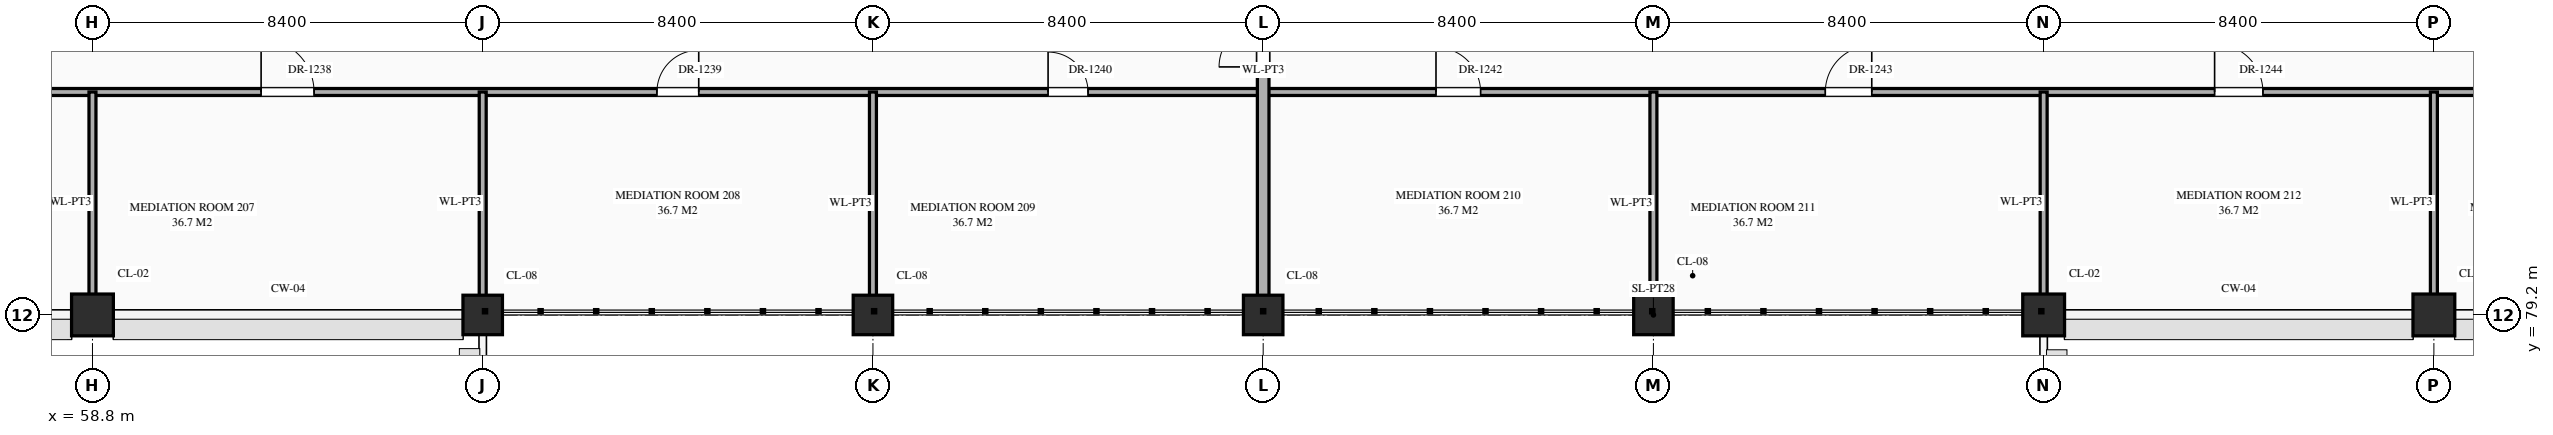
"""IFC4 building model, lengths in metres.
Left out: names, types, materials, properties, quantities, classifications, styles, units other than length and angle.
Written with IfcOpenShell. Run it as: python <this file> out.ifc"""

import sys

from ifc_helpers import new_model, si_unit, direction, frame, frame_2d, origin, origin_2d, place, context, subcontext, project, spatial, rectangle, circle, extrude, element, fill, save


model = new_model("IFC4")
c1 = context("Model", 3, precision=1e-05, world=origin(), true_north=direction((0.0, 1.0)))
c2 = subcontext(c1, "Body", "Model", "MODEL_VIEW")
j1 = project(units=[si_unit("LENGTHUNIT", "METRE"), si_unit("PLANEANGLEUNIT", "RADIAN")], contexts=[c1])
p1 = place(None, origin())
s1 = spatial("IfcSite", under=j1, at=p1, CompositionType="ELEMENT")
p2 = place(p1, origin())
s2 = spatial("IfcBuilding", under=s1, at=p2, CompositionType="ELEMENT")
p3 = place(p2, frame((0.0, 0.0, 5.4)))
s3 = spatial("IfcBuildingStorey", under=s2, at=p3, CompositionType="ELEMENT", Elevation=5.4)
p4 = place(p3, frame((58.8, 79.2, 0.0), z_axis=(0.0, 0.0, 1.0), x_axis=(1.0, 0.0, 0.0)))
e1 = element("IfcColumn", 1, at=p4, inside=s3, PredefinedType="COLUMN", context=c2, shape_type="SweptSolid", body=[
    extrude(rectangle(XDim=0.9, YDim=0.9, at=origin_2d()), origin(), (0.0, 0.0, 1.0), 5.4),
])
for number, where, z_axis, x_axis in (
    (2, (67.2, 79.2, 0.0), (0.0, 0.0, 1.0), (1.0, 0.0, 0.0)),
    (3, (75.6, 79.2, 0.0), (0.0, 0.0, 1.0), (1.0, 0.0, 0.0)),
    (4, (84.0, 79.2, 0.0), (0.0, 0.0, 1.0), (1.0, 0.0, 0.0)),
    (5, (92.4, 79.2, 0.0), (0.0, 0.0, 1.0), (1.0, 0.0, 0.0)),
):
    element("IfcColumn", number, at=place(p3, frame(where, z_axis=z_axis, x_axis=x_axis)), inside=s3, PredefinedType="COLUMN", context=c2, shape_type="SweptSolid", body=[
        extrude(circle(Radius=0.425, at=origin_2d()), origin(), (0.0, 0.0, 1.0), 5.4),
    ])
for number, where, z_axis, x_axis in (
    (6, (100.8, 79.2, 0.0), (0.0, 0.0, 1.0), (1.0, 0.0, 0.0)),
    (7, (109.2, 79.2, 0.0), (0.0, 0.0, 1.0), (1.0, 0.0, 0.0)),
):
    element("IfcColumn", number, at=place(p3, frame(where, z_axis=z_axis, x_axis=x_axis)), inside=s3, PredefinedType="COLUMN", context=c2, shape_type="SweptSolid", body=[
        extrude(rectangle(XDim=0.9, YDim=0.9, at=origin_2d()), origin(), (0.0, 0.0, 1.0), 5.4),
    ])
p5 = place(p3, frame((16.8, 84.0, 0.0), z_axis=(0.0, 0.0, 1.0), x_axis=(1.0, 0.0, 0.0)))
e8 = element("IfcWall", 8, at=p5, inside=s3, PredefinedType="STANDARD", context=c2, shape_type="SweptSolid", body=[
    extrude(rectangle(XDim=134.4, YDim=0.15, at=frame_2d((67.2, 0.0))), origin(), (0.0, 0.0, 1.0), 5.12),
])
p6 = place(p5, frame((3.58, 0.0, 0.0)))
e9 = element("IfcOpeningElement", 9, at=p6, cuts=e8, PredefinedType="OPENING", context=c2, shape_type="SweptSolid", body=[
    extrude(rectangle(XDim=1.24, YDim=2.3, at=frame_2d((0.62, 1.15))), frame((0.0, 0.087, 0.0), z_axis=(0.0, -1.0, 0.0), x_axis=(1.0, 0.0, 0.0)), (0.0, 0.0, 1.0), 0.174),
])
p7 = place(p5, frame((11.96, 0.0, 0.0)))
e10 = element("IfcOpeningElement", 10, at=p7, cuts=e8, PredefinedType="OPENING", context=c2, shape_type="SweptSolid", body=[
    extrude(rectangle(XDim=1.28, YDim=2.35, at=frame_2d((0.64, 1.175))), frame((0.0, 0.087, 0.0), z_axis=(0.0, -1.0, 0.0), x_axis=(1.0, 0.0, 0.0)), (0.0, 0.0, 1.0), 0.174),
])
p8 = place(p5, frame((20.53, 0.0, 0.0)))
e11 = element("IfcOpeningElement", 11, at=p8, cuts=e8, PredefinedType="OPENING", context=c2, shape_type="SweptSolid", body=[
    extrude(rectangle(XDim=0.94, YDim=2.3, at=frame_2d((0.47, 1.15))), frame((0.0, 0.087, 0.0), z_axis=(0.0, -1.0, 0.0), x_axis=(1.0, 0.0, 0.0)), (0.0, 0.0, 1.0), 0.174),
])
p9 = place(p5, frame((28.91, 0.0, 0.0)))
e12 = element("IfcOpeningElement", 12, at=p9, cuts=e8, PredefinedType="OPENING", context=c2, shape_type="SweptSolid", body=[
    extrude(rectangle(XDim=0.98, YDim=2.35, at=frame_2d((0.49, 1.175))), frame((0.0, 0.087, 0.0), z_axis=(0.0, -1.0, 0.0), x_axis=(1.0, 0.0, 0.0)), (0.0, 0.0, 1.0), 0.174),
])
p10 = place(p5, frame((37.27, 0.0, 0.0)))
e13 = element("IfcOpeningElement", 13, at=p10, cuts=e8, PredefinedType="OPENING", context=c2, shape_type="SweptSolid", body=[
    extrude(rectangle(XDim=1.06, YDim=2.4, at=frame_2d((0.53, 1.2))), frame((0.0, 0.087, 0.0), z_axis=(0.0, -1.0, 0.0), x_axis=(1.0, 0.0, 0.0)), (0.0, 0.0, 1.0), 0.174),
])
p11 = place(p5, frame((45.63, 0.0, 0.0)))
e14 = element("IfcOpeningElement", 14, at=p11, cuts=e8, PredefinedType="OPENING", context=c2, shape_type="SweptSolid", body=[
    extrude(rectangle(XDim=1.14, YDim=2.4, at=frame_2d((0.57, 1.2))), frame((0.0, 0.087, 0.0), z_axis=(0.0, -1.0, 0.0), x_axis=(1.0, 0.0, 0.0)), (0.0, 0.0, 1.0), 0.174),
])
p12 = place(p5, frame((54.15, 0.0, 0.0)))
e15 = element("IfcOpeningElement", 15, at=p12, cuts=e8, PredefinedType="OPENING", context=c2, shape_type="SweptSolid", body=[
    extrude(rectangle(XDim=0.9, YDim=2.15, at=frame_2d((0.45, 1.075))), frame((0.0, 0.087, 0.0), z_axis=(0.0, -1.0, 0.0), x_axis=(1.0, 0.0, 0.0)), (0.0, 0.0, 1.0), 0.174),
])
p13 = place(p5, frame((62.57, 0.0, 0.0)))
e16 = element("IfcOpeningElement", 16, at=p13, cuts=e8, PredefinedType="OPENING", context=c2, shape_type="SweptSolid", body=[
    extrude(rectangle(XDim=0.86, YDim=2.1, at=frame_2d((0.43, 1.05))), frame((0.0, 0.087, 0.0), z_axis=(0.0, -1.0, 0.0), x_axis=(1.0, 0.0, 0.0)), (0.0, 0.0, 1.0), 0.174),
])
p14 = place(p5, frame((70.92, 0.0, 0.0)))
e17 = element("IfcOpeningElement", 17, at=p14, cuts=e8, PredefinedType="OPENING", context=c2, shape_type="SweptSolid", body=[
    extrude(rectangle(XDim=0.96, YDim=2.2, at=frame_2d((0.48, 1.1))), frame((0.0, 0.087, 0.0), z_axis=(0.0, -1.0, 0.0), x_axis=(1.0, 0.0, 0.0)), (0.0, 0.0, 1.0), 0.174),
])
p15 = place(p5, frame((79.3, 0.0, 0.0)))
e18 = element("IfcOpeningElement", 18, at=p15, cuts=e8, PredefinedType="OPENING", context=c2, shape_type="SweptSolid", body=[
    extrude(rectangle(XDim=1.0, YDim=2.25, at=frame_2d((0.5, 1.125))), frame((0.0, 0.087, 0.0), z_axis=(0.0, -1.0, 0.0), x_axis=(1.0, 0.0, 0.0)), (0.0, 0.0, 1.0), 0.174),
])
p16 = place(p5, frame((87.68, 0.0, 0.0)))
e19 = element("IfcOpeningElement", 19, at=p16, cuts=e8, PredefinedType="OPENING", context=c2, shape_type="SweptSolid", body=[
    extrude(rectangle(XDim=1.04, YDim=2.2, at=frame_2d((0.52, 1.1))), frame((0.0, 0.087, 0.0), z_axis=(0.0, -1.0, 0.0), x_axis=(1.0, 0.0, 0.0)), (0.0, 0.0, 1.0), 0.174),
])
p17 = place(p5, frame((96.06, 0.0, 0.0)))
e20 = element("IfcOpeningElement", 20, at=p17, cuts=e8, PredefinedType="OPENING", context=c2, shape_type="SweptSolid", body=[
    extrude(rectangle(XDim=1.08, YDim=2.25, at=frame_2d((0.54, 1.125))), frame((0.0, 0.087, 0.0), z_axis=(0.0, -1.0, 0.0), x_axis=(1.0, 0.0, 0.0)), (0.0, 0.0, 1.0), 0.174),
])
p18 = place(p5, frame((104.44, 0.0, 0.0)))
e21 = element("IfcOpeningElement", 21, at=p18, cuts=e8, PredefinedType="OPENING", context=c2, shape_type="SweptSolid", body=[
    extrude(rectangle(XDim=1.12, YDim=2.25, at=frame_2d((0.56, 1.125))), frame((0.0, 0.087, 0.0), z_axis=(0.0, -1.0, 0.0), x_axis=(1.0, 0.0, 0.0)), (0.0, 0.0, 1.0), 0.174),
])
p19 = place(p5, frame((112.82, 0.0, 0.0)))
e22 = element("IfcOpeningElement", 22, at=p19, cuts=e8, PredefinedType="OPENING", context=c2, shape_type="SweptSolid", body=[
    extrude(rectangle(XDim=1.16, YDim=2.3, at=frame_2d((0.58, 1.15))), frame((0.0, 0.087, 0.0), z_axis=(0.0, -1.0, 0.0), x_axis=(1.0, 0.0, 0.0)), (0.0, 0.0, 1.0), 0.174),
])
p20 = place(p5, frame((121.2, 0.0, 0.0)))
e23 = element("IfcOpeningElement", 23, at=p20, cuts=e8, PredefinedType="OPENING", context=c2, shape_type="SweptSolid", body=[
    extrude(rectangle(XDim=1.2, YDim=2.35, at=frame_2d((0.6, 1.175))), frame((0.0, 0.087, 0.0), z_axis=(0.0, -1.0, 0.0), x_axis=(1.0, 0.0, 0.0)), (0.0, 0.0, 1.0), 0.174),
])
p21 = place(p5, frame((129.58, 0.0, 0.0)))
e24 = element("IfcOpeningElement", 24, at=p21, cuts=e8, PredefinedType="OPENING", context=c2, shape_type="SweptSolid", body=[
    extrude(rectangle(XDim=1.24, YDim=2.3, at=frame_2d((0.62, 1.15))), frame((0.0, 0.087, 0.0), z_axis=(0.0, -1.0, 0.0), x_axis=(1.0, 0.0, 0.0)), (0.0, 0.0, 1.0), 0.174),
])
for number, where, z_axis, x_axis in (
    (25, (58.8, 79.24, 0.0), (0.0, 0.0, 1.0), (0.0, 1.0, 0.0)),
    (26, (67.2, 79.24, 0.0), (0.0, 0.0, 1.0), (0.0, 1.0, 0.0)),
):
    element("IfcWall", number, at=place(p3, frame(where, z_axis=z_axis, x_axis=x_axis)), inside=s3, PredefinedType="STANDARD", context=c2, shape_type="SweptSolid", body=[
        extrude(rectangle(XDim=4.76, YDim=0.15, at=frame_2d((2.38, 0.0))), origin(), (0.0, 0.0, 1.0), 4.37),
    ])
p22 = place(p3, frame((75.6, 79.2, 0.0), z_axis=(0.0, 0.0, 1.0), x_axis=(0.0, 1.0, 0.0)))
e27 = element("IfcWall", 27, at=p22, inside=s3, PredefinedType="STANDARD", context=c2, shape_type="SweptSolid", body=[
    extrude(rectangle(XDim=4.8, YDim=0.15, at=frame_2d((2.4, 0.0))), origin(), (0.0, 0.0, 1.0), 4.37),
])
p23 = place(p3, frame((84.0, 79.2, 0.0), z_axis=(0.0, 0.0, 1.0), x_axis=(0.0, 1.0, 0.0)))
e28 = element("IfcWall", 28, at=p23, inside=s3, PredefinedType="STANDARD", context=c2, shape_type="SweptSolid", body=[
    extrude(rectangle(XDim=16.8, YDim=0.25, at=frame_2d((8.4, 0.0))), origin(), (0.0, 0.0, 1.0), 4.37),
])
p24 = place(p23, frame((12.465, 0.0, 0.0)))
e29 = element("IfcOpeningElement", 29, at=p24, cuts=e28, PredefinedType="OPENING", context=c2, shape_type="SweptSolid", body=[
    extrude(rectangle(XDim=1.1, YDim=2.2, at=frame_2d((0.55, 1.1))), frame((0.0, 0.137, 0.0), z_axis=(0.0, -1.0, 0.0), x_axis=(1.0, 0.0, 0.0)), (0.0, 0.0, 1.0), 0.274),
])
p25 = place(p23, frame((15.31, 0.0, 0.0)))
e30 = element("IfcOpeningElement", 30, at=p25, cuts=e28, PredefinedType="OPENING", context=c2, shape_type="SweptSolid", body=[
    extrude(rectangle(XDim=0.95, YDim=2.15, at=frame_2d((0.475, 1.075))), frame((0.0, 0.137, 0.0), z_axis=(0.0, -1.0, 0.0), x_axis=(1.0, 0.0, 0.0)), (0.0, 0.0, 1.0), 0.274),
])
p26 = place(p23, frame((5.34, 0.0, 0.0)))
e31 = element("IfcOpeningElement", 31, at=p26, cuts=e28, PredefinedType="OPENING", context=c2, shape_type="SweptSolid", body=[
    extrude(rectangle(XDim=0.95, YDim=2.15, at=frame_2d((0.475, 1.075))), frame((0.0, 0.137, 0.0), z_axis=(0.0, -1.0, 0.0), x_axis=(1.0, 0.0, 0.0)), (0.0, 0.0, 1.0), 0.274),
])
p27 = place(p3, frame((92.4, 79.2, 0.0), z_axis=(0.0, 0.0, 1.0), x_axis=(0.0, 1.0, 0.0)))
e32 = element("IfcWall", 32, at=p27, inside=s3, PredefinedType="STANDARD", context=c2, shape_type="SweptSolid", body=[
    extrude(rectangle(XDim=4.8, YDim=0.15, at=frame_2d((2.4, 0.0))), origin(), (0.0, 0.0, 1.0), 4.37),
])
for number, where, z_axis, x_axis in (
    (33, (100.8, 79.24, 0.0), (0.0, 0.0, 1.0), (0.0, 1.0, 0.0)),
    (34, (109.2, 79.24, 0.0), (0.0, 0.0, 1.0), (0.0, 1.0, 0.0)),
):
    element("IfcWall", number, at=place(p3, frame(where, z_axis=z_axis, x_axis=x_axis)), inside=s3, PredefinedType="STANDARD", context=c2, shape_type="SweptSolid", body=[
        extrude(rectangle(XDim=4.76, YDim=0.15, at=frame_2d((2.38, 0.0))), origin(), (0.0, 0.0, 1.0), 4.37),
    ])
p28 = place(p26, origin())
e35 = element("IfcDoor", 35, at=p28, inside=s3, OperationType="SINGLE_SWING_LEFT", PredefinedType="DOOR", context=c2, shape_type="SweptSolid", body=[
    extrude(rectangle(XDim=0.95, YDim=2.15, at=frame_2d((0.475, 1.075))), frame((0.0, 0.025, 0.0), z_axis=(0.0, -1.0, 0.0), x_axis=(1.0, 0.0, 0.0)), (0.0, 0.0, 1.0), 0.05),
])
fill(e31, e35)
p29 = place(p11, origin())
e36 = element("IfcDoor", 36, at=p29, inside=s3, OperationType="SINGLE_SWING_LEFT", PredefinedType="DOOR", context=c2, shape_type="SweptSolid", body=[
    extrude(rectangle(XDim=1.14, YDim=2.4, at=frame_2d((0.57, 1.2))), frame((0.0, 0.025, 0.0), z_axis=(0.0, -1.0, 0.0), x_axis=(1.0, 0.0, 0.0)), (0.0, 0.0, 1.0), 0.05),
])
fill(e14, e36)
p30 = place(p12, origin())
e37 = element("IfcDoor", 37, at=p30, inside=s3, OperationType="SINGLE_SWING_RIGHT", PredefinedType="DOOR", context=c2, shape_type="SweptSolid", body=[
    extrude(rectangle(XDim=0.9, YDim=2.15, at=frame_2d((0.45, 1.075))), frame((0.0, 0.025, 0.0), z_axis=(0.0, -1.0, 0.0), x_axis=(1.0, 0.0, 0.0)), (0.0, 0.0, 1.0), 0.05),
])
fill(e15, e37)
p31 = place(p13, origin())
e38 = element("IfcDoor", 38, at=p31, inside=s3, OperationType="SINGLE_SWING_LEFT", PredefinedType="DOOR", context=c2, shape_type="SweptSolid", body=[
    extrude(rectangle(XDim=0.86, YDim=2.1, at=frame_2d((0.43, 1.05))), frame((0.0, 0.025, 0.0), z_axis=(0.0, -1.0, 0.0), x_axis=(1.0, 0.0, 0.0)), (0.0, 0.0, 1.0), 0.05),
])
fill(e16, e38)
p32 = place(p14, origin())
e39 = element("IfcDoor", 39, at=p32, inside=s3, OperationType="SINGLE_SWING_LEFT", PredefinedType="DOOR", context=c2, shape_type="SweptSolid", body=[
    extrude(rectangle(XDim=0.96, YDim=2.2, at=frame_2d((0.48, 1.1))), frame((0.0, 0.025, 0.0), z_axis=(0.0, -1.0, 0.0), x_axis=(1.0, 0.0, 0.0)), (0.0, 0.0, 1.0), 0.05),
])
fill(e17, e39)
p33 = place(p15, origin())
e40 = element("IfcDoor", 40, at=p33, inside=s3, OperationType="SINGLE_SWING_RIGHT", PredefinedType="DOOR", context=c2, shape_type="SweptSolid", body=[
    extrude(rectangle(XDim=1.0, YDim=2.25, at=frame_2d((0.5, 1.125))), frame((0.0, 0.025, 0.0), z_axis=(0.0, -1.0, 0.0), x_axis=(1.0, 0.0, 0.0)), (0.0, 0.0, 1.0), 0.05),
])
fill(e18, e40)
p34 = place(p16, origin())
e41 = element("IfcDoor", 41, at=p34, inside=s3, OperationType="SINGLE_SWING_LEFT", PredefinedType="DOOR", context=c2, shape_type="SweptSolid", body=[
    extrude(rectangle(XDim=1.04, YDim=2.2, at=frame_2d((0.52, 1.1))), frame((0.0, 0.025, 0.0), z_axis=(0.0, -1.0, 0.0), x_axis=(1.0, 0.0, 0.0)), (0.0, 0.0, 1.0), 0.05),
])
fill(e19, e41)
save(model, sys.argv[1])
